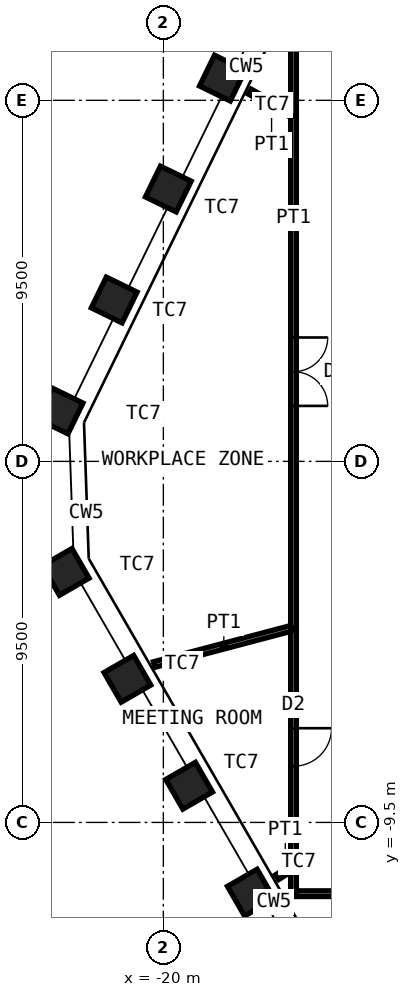
"""IFC4 building model, lengths in metres.
Left out: names, types, materials, properties, quantities, classifications, styles, units other than length and angle.
Written with IfcOpenShell. Run it as: python <this file> out.ifc"""

import sys

from ifc_helpers import new_model, si_unit, direction, frame, frame_2d, origin, origin_2d, place, context, subcontext, project, spatial, rectangle, hollow_rectangle, extrude, element, fill, save


model = new_model("IFC4")
c1 = context("Model", 3, precision=1e-05, world=origin(), true_north=direction((0.0, 1.0)))
c2 = subcontext(c1, "Body", "Model", "MODEL_VIEW")
j1 = project(units=[si_unit("LENGTHUNIT", "METRE"), si_unit("PLANEANGLEUNIT", "RADIAN")], contexts=[c1])
p1 = place(None, origin())
s1 = spatial("IfcSite", under=j1, at=p1, CompositionType="ELEMENT")
p2 = place(p1, origin())
s2 = spatial("IfcBuilding", under=s1, at=p2, CompositionType="ELEMENT")
p3 = place(p2, frame((0.0, 0.0, 291.4)))
s3 = spatial("IfcBuildingStorey", under=s2, at=p3, CompositionType="ELEMENT", Elevation=291.4)
for number, where, z_axis, x_axis in (
    (1, (-17.698, -11.347, 0.0), (0.0, 0.0, 1.0), (0.5, -0.866, 0.0)),
    (2, (-19.322, -8.534, 0.0), (0.0, 0.0, 1.0), (0.5, -0.866, 0.0)),
    (3, (-20.946, -5.721, 0.0), (0.0, 0.0, 1.0), (0.5, -0.866, 0.0)),
    (4, (-22.57, -2.908, 0.0), (0.0, 0.0, 1.0), (0.5, -0.866, 0.0)),
    (5, (-22.717, 1.327, 0.0), (0.0, 0.0, 1.0), (-0.438, -0.899, 0.0)),
    (6, (-21.293, 4.246, 0.0), (0.0, 0.0, 1.0), (-0.438, -0.899, 0.0)),
    (7, (-19.87, 7.166, 0.0), (0.0, 0.0, 1.0), (-0.438, -0.899, 0.0)),
    (8, (-18.446, 10.085, 0.0), (0.0, 0.0, 1.0), (-0.438, -0.899, 0.0)),
):
    element("IfcColumn", number, at=place(p3, frame(where, z_axis=z_axis, x_axis=x_axis)), inside=s3, PredefinedType="COLUMN", context=c2, shape_type="SweptSolid", body=[
        extrude(hollow_rectangle(XDim=0.9, YDim=0.9, WallThickness=0.06, at=origin_2d()), origin(), (0.0, 0.0, 1.0), 4.2),
    ])
p4 = place(p3, frame((-17.729, 9.73, 0.0), z_axis=(0.0, 0.0, 1.0), x_axis=(0.87667364743, -0.481085559855, 0.0)))
e9 = element("IfcWall", 9, at=p4, inside=s3, PredefinedType="PARTITIONING", context=c2, shape_type="SweptSolid", body=[
    extrude(rectangle(XDim=1.316, YDim=0.15, at=frame_2d((0.658, 0.0))), origin(), (0.0, 0.0, 1.0), 3.33),
])
p5 = place(p3, frame((-16.575, 9.097, 0.0), z_axis=(0.0, 0.0, 1.0), x_axis=(0.0, 1.0, 0.0)))
e10 = element("IfcWall", 10, at=p5, inside=s3, PredefinedType="PARTITIONING", context=c2, shape_type="SweptSolid", body=[
    extrude(rectangle(XDim=2.278, YDim=0.15, at=frame_2d((1.139, 0.0))), origin(), (0.0, 0.0, 1.0), 4.03),
])
p6 = place(p3, frame((-9.473, -11.375, 0.0), z_axis=(0.0, 0.0, 1.0), x_axis=(-1.0, 0.0, 0.0)))
e11 = element("IfcWall", 11, at=p6, inside=s3, PredefinedType="PARTITIONING", context=c2, shape_type="SweptSolid", body=[
    extrude(rectangle(XDim=7.102, YDim=0.15, at=frame_2d((3.551, 0.0))), origin(), (0.0, 0.0, 1.0), 4.03),
])
p7 = place(p6, frame((3.051, 0.0, 0.0)))
e12 = element("IfcOpeningElement", 12, at=p7, cuts=e11, PredefinedType="OPENING", context=c2, shape_type="SweptSolid", body=[
    extrude(rectangle(XDim=1.0, YDim=2.4, at=frame_2d((0.5, 1.2))), frame((0.0, 0.085, 0.0), z_axis=(0.0, -1.0, 0.0), x_axis=(1.0, 0.0, 0.0)), (0.0, 0.0, 1.0), 0.17),
])
p8 = place(p3, frame((-16.575, -11.375, 0.0), z_axis=(0.0, 0.0, 1.0), x_axis=(0.0, 1.0, 0.0)))
e13 = element("IfcWall", 13, at=p8, inside=s3, PredefinedType="PARTITIONING", context=c2, shape_type="SweptSolid", body=[
    extrude(rectangle(XDim=0.71, YDim=0.15, at=frame_2d((0.355, 0.0))), origin(), (0.0, 0.0, 1.0), 4.03),
])
p9 = place(p3, frame((-17.007, -10.943, 0.0), z_axis=(0.0, 0.0, 1.0), x_axis=(0.840931402951, 0.541141733311, 0.0)))
e14 = element("IfcWall", 14, at=p9, inside=s3, PredefinedType="PARTITIONING", context=c2, shape_type="SweptSolid", body=[
    extrude(rectangle(XDim=0.514, YDim=0.15, at=frame_2d((0.257, 0.0))), origin(), (0.0, 0.0, 1.0), 3.33),
])
p10 = place(p3, frame((-16.575, -10.665, 0.0), z_axis=(0.0, 0.0, 1.0), x_axis=(0.0, 1.0, 0.0)))
e15 = element("IfcWall", 15, at=p10, inside=s3, PredefinedType="PARTITIONING", context=c2, shape_type="SweptSolid", body=[
    extrude(rectangle(XDim=6.288, YDim=0.15, at=frame_2d((3.144, 0.0))), origin(), (0.0, 0.0, 1.0), 4.03),
])
p11 = place(p10, frame((2.644, 0.0, 0.0)))
e16 = element("IfcOpeningElement", 16, at=p11, cuts=e15, PredefinedType="OPENING", context=c2, shape_type="SweptSolid", body=[
    extrude(rectangle(XDim=1.0, YDim=2.4, at=frame_2d((0.5, 1.2))), frame((0.0, 0.085, 0.0), z_axis=(0.0, -1.0, 0.0), x_axis=(1.0, 0.0, 0.0)), (0.0, 0.0, 1.0), 0.17),
])
p12 = place(p3, frame((-20.243, -5.346, 0.0), z_axis=(0.0, 0.0, 1.0), x_axis=(0.966843218991, 0.255370691137, 0.0)))
e17 = element("IfcWall", 17, at=p12, inside=s3, PredefinedType="PARTITIONING", context=c2, shape_type="SweptSolid", body=[
    extrude(rectangle(XDim=3.793, YDim=0.15, at=frame_2d((1.897, 0.0))), origin(), (0.0, 0.0, 1.0), 3.33),
])
p13 = place(p3, frame((-16.575, -4.377, 0.0), z_axis=(0.0, 0.0, 1.0), x_axis=(0.0, 1.0, 0.0)))
e18 = element("IfcWall", 18, at=p13, inside=s3, PredefinedType="PARTITIONING", context=c2, shape_type="SweptSolid", body=[
    extrude(rectangle(XDim=13.474, YDim=0.15, at=frame_2d((6.737, 0.0))), origin(), (0.0, 0.0, 1.0), 4.03),
])
p14 = place(p13, frame((5.837, 0.0, 0.0)))
e19 = element("IfcOpeningElement", 19, at=p14, cuts=e18, PredefinedType="OPENING", context=c2, shape_type="SweptSolid", body=[
    extrude(rectangle(XDim=1.8, YDim=2.4, at=frame_2d((0.9, 1.2))), frame((0.0, 0.085, 0.0), z_axis=(0.0, -1.0, 0.0), x_axis=(1.0, 0.0, 0.0)), (0.0, 0.0, 1.0), 0.17),
])
p15 = place(p11, origin())
e20 = element("IfcDoor", 20, at=p15, inside=s3, OperationType="SINGLE_SWING_RIGHT", PredefinedType="DOOR", context=c2, shape_type="SweptSolid", body=[
    extrude(rectangle(XDim=1.0, YDim=2.4, at=frame_2d((0.5, 1.2))), frame((0.0, 0.025, 0.0), z_axis=(0.0, -1.0, 0.0), x_axis=(1.0, 0.0, 0.0)), (0.0, 0.0, 1.0), 0.05),
])
fill(e16, e20)
p16 = place(p14, origin())
e21 = element("IfcDoor", 21, at=p16, inside=s3, OperationType="DOUBLE_DOOR_DOUBLE_SWING", PredefinedType="DOOR", context=c2, shape_type="SweptSolid", body=[
    extrude(rectangle(XDim=1.8, YDim=2.4, at=frame_2d((0.9, 1.2))), frame((0.0, 0.025, 0.0), z_axis=(0.0, -1.0, 0.0), x_axis=(1.0, 0.0, 0.0)), (0.0, 0.0, 1.0), 0.05),
])
fill(e19, e21)
save(model, sys.argv[1])
